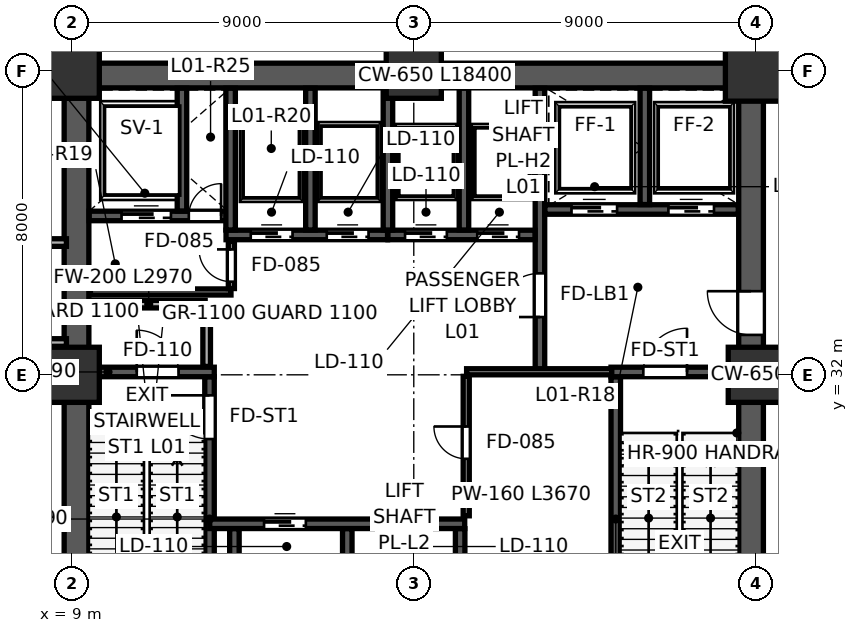
"""IFC4 building model, lengths in metres.
Left out: names, types, materials, properties, quantities, classifications, styles, units other than length and angle.
Written with IfcOpenShell. Run it as: python <this file> out.ifc"""

import sys

from ifc_helpers import new_model, si_unit, direction, frame, frame_2d, origin, origin_2d, place, context, subcontext, project, spatial, rectangle, extrude, source, transform, mapped, element, fill, save


model = new_model("IFC4")
c1 = context("Model", 3, precision=1e-05, world=origin(), true_north=direction((0.0, 1.0)))
c2 = subcontext(c1, "Body", "Model", "MODEL_VIEW")
j1 = project(units=[si_unit("LENGTHUNIT", "METRE"), si_unit("PLANEANGLEUNIT", "RADIAN")], contexts=[c1])
p1 = place(None, origin())
s1 = spatial("IfcSite", under=j1, at=p1, CompositionType="ELEMENT")
p2 = place(p1, origin())
s2 = spatial("IfcBuilding", under=s1, at=p2, CompositionType="ELEMENT")
p3 = place(p2, origin())
s3 = spatial("IfcBuildingStorey", under=s2, at=p3, CompositionType="ELEMENT", Elevation=0.0)
m1 = source(origin(), c2, "Body", "SweptSolid", [
    extrude(rectangle(XDim=1.45, YDim=1.45, at=origin_2d()), origin(), (0.0, 0.0, 1.0), 5.999),
])
for number, where, z_axis, x_axis in (
    (1, (9.0, 32.0, 0.001), (0.0, 0.0, 1.0), (1.0, 0.0, 0.0)),
    (2, (9.0, 40.0, 0.001), (0.0, 0.0, 1.0), (1.0, 0.0, 0.0)),
    (3, (18.0, 40.0, 0.001), (0.0, 0.0, 1.0), (1.0, 0.0, 0.0)),
    (4, (27.0, 32.0, 0.001), (0.0, 0.0, 1.0), (1.0, 0.0, 0.0)),
):
    element("IfcColumn", number, at=place(p3, frame(where, z_axis=z_axis, x_axis=x_axis)), inside=s3, PredefinedType="COLUMN", context=c2, shape_type="MappedRepresentation", body=[
        mapped(m1, transform((0.0, 0.0, 0.0), scale=1.0)),
    ])
m2 = source(origin(), c2, "Body", "SweptSolid", [
    extrude(rectangle(XDim=1.6, YDim=1.6, at=origin_2d()), origin(), (0.0, 0.0, 1.0), 5.999),
])
p4 = place(p3, frame((27.0, 40.0, 0.001), z_axis=(0.0, 0.0, 1.0), x_axis=(1.0, 0.0, 0.0)))
e5 = element("IfcColumn", 5, at=p4, inside=s3, PredefinedType="COLUMN", context=c2, shape_type="MappedRepresentation", body=[
    mapped(m2, transform((0.0, 0.0, 0.0), scale=1.0)),
])
p5 = place(p3, frame((9.125, 24.45, 0.0), z_axis=(0.0, 0.0, 1.0), x_axis=(0.0, 1.0, 0.0)))
e6 = element("IfcWall", 6, at=p5, inside=s3, PredefinedType="SHEAR", context=c2, shape_type="SweptSolid", body=[
    extrude(rectangle(XDim=15.1, YDim=0.65, at=frame_2d((7.55, 0.0))), origin(), (0.0, 0.0, 1.0), 5.74),
])
p6 = place(p3, frame((26.875, 24.45, 0.0), z_axis=(0.0, 0.0, 1.0), x_axis=(0.0, 1.0, 0.0)))
e7 = element("IfcWall", 7, at=p6, inside=s3, PredefinedType="SHEAR", context=c2, shape_type="SweptSolid", body=[
    extrude(rectangle(XDim=15.1, YDim=0.65, at=frame_2d((7.55, 0.0))), origin(), (0.0, 0.0, 1.0), 5.74),
])
p7 = place(p6, frame((8.6, 0.0, 0.0)))
e8 = element("IfcOpeningElement", 8, at=p7, cuts=e7, PredefinedType="OPENING", context=c2, shape_type="SweptSolid", body=[
    extrude(rectangle(XDim=1.15, YDim=2.2, at=frame_2d((0.575, 1.1))), frame((0.0, 0.335, 0.0), z_axis=(0.0, -1.0, 0.0), x_axis=(1.0, 0.0, 0.0)), (0.0, 0.0, 1.0), 0.67),
])
p8 = place(p3, frame((8.8, 39.875, 0.0), z_axis=(0.0, 0.0, 1.0), x_axis=(1.0, 0.0, 0.0)))
e9 = element("IfcWall", 9, at=p8, inside=s3, PredefinedType="SHEAR", context=c2, shape_type="SweptSolid", body=[
    extrude(rectangle(XDim=18.4, YDim=0.65, at=frame_2d((9.2, 0.0))), origin(), (0.0, 0.0, 1.0), 5.74),
])
p9 = place(p3, frame((12.625, 24.46, 0.0), z_axis=(0.0, 0.0, 1.0), x_axis=(0.0, 1.0, 0.0)))
e10 = element("IfcWall", 10, at=p9, inside=s3, PredefinedType="SHEAR", context=c2, shape_type="SweptSolid", body=[
    extrude(rectangle(XDim=7.49, YDim=0.25, at=frame_2d((3.745, 0.0))), origin(), (0.0, 0.0, 1.0), 5.74),
])
p10 = place(p9, frame((5.85, 0.0, 0.0)))
e11 = element("IfcOpeningElement", 11, at=p10, cuts=e10, PredefinedType="OPENING", context=c2, shape_type="SweptSolid", body=[
    extrude(rectangle(XDim=1.15, YDim=2.2, at=frame_2d((0.575, 1.1))), frame((0.0, 0.135, 0.0), z_axis=(0.0, -1.0, 0.0), x_axis=(1.0, 0.0, 0.0)), (0.0, 0.0, 1.0), 0.27),
])
p11 = place(p3, frame((9.46, 32.075, 0.0), z_axis=(0.0, 0.0, 1.0), x_axis=(1.0, 0.0, 0.0)))
e12 = element("IfcWall", 12, at=p11, inside=s3, PredefinedType="SHEAR", context=c2, shape_type="SweptSolid", body=[
    extrude(rectangle(XDim=3.29, YDim=0.25, at=frame_2d((1.645, 0.0))), origin(), (0.0, 0.0, 1.0), 5.74),
])
p12 = place(p11, frame((1.25, 0.0, 0.0)))
e13 = element("IfcOpeningElement", 13, at=p12, cuts=e12, PredefinedType="OPENING", context=c2, shape_type="SweptSolid", body=[
    extrude(rectangle(XDim=1.1, YDim=2.2, at=frame_2d((0.55, 1.1))), frame((0.0, 0.135, 0.0), z_axis=(0.0, -1.0, 0.0), x_axis=(1.0, 0.0, 0.0)), (0.0, 0.0, 1.0), 0.27),
])
p13 = place(p3, frame((23.315, 24.46, 0.0), z_axis=(0.0, 0.0, 1.0), x_axis=(0.0, 1.0, 0.0)))
e14 = element("IfcWall", 14, at=p13, inside=s3, PredefinedType="SHEAR", context=c2, shape_type="SweptSolid", body=[
    extrude(rectangle(XDim=7.49, YDim=0.25, at=frame_2d((3.745, 0.0))), origin(), (0.0, 0.0, 1.0), 5.74),
])
p14 = place(p3, frame((23.19, 32.075, 0.0), z_axis=(0.0, 0.0, 1.0), x_axis=(1.0, 0.0, 0.0)))
e15 = element("IfcWall", 15, at=p14, inside=s3, PredefinedType="SHEAR", context=c2, shape_type="SweptSolid", body=[
    extrude(rectangle(XDim=3.35, YDim=0.25, at=frame_2d((1.675, 0.0))), origin(), (0.0, 0.0, 1.0), 5.74),
])
p15 = place(p14, frame((0.85, 0.0, 0.0)))
e16 = element("IfcOpeningElement", 16, at=p15, cuts=e15, PredefinedType="OPENING", context=c2, shape_type="SweptSolid", body=[
    extrude(rectangle(XDim=1.15, YDim=2.2, at=frame_2d((0.575, 1.1))), frame((0.0, 0.135, 0.0), z_axis=(0.0, -1.0, 0.0), x_axis=(1.0, 0.0, 0.0)), (0.0, 0.0, 1.0), 0.27),
])
p16 = place(p3, frame((21.32, 32.12, 0.0), z_axis=(0.0, 0.0, 1.0), x_axis=(0.0, 1.0, 0.0)))
e17 = element("IfcWall", 17, at=p16, inside=s3, PredefinedType="SHEAR", context=c2, shape_type="SweptSolid", body=[
    extrude(rectangle(XDim=7.42, YDim=0.25, at=frame_2d((3.71, 0.0))), origin(), (0.0, 0.0, 1.0), 5.74),
])
p17 = place(p16, frame((1.4, 0.0, 0.0)))
e18 = element("IfcOpeningElement", 18, at=p17, cuts=e17, PredefinedType="OPENING", context=c2, shape_type="SweptSolid", body=[
    extrude(rectangle(XDim=1.15, YDim=2.2, at=frame_2d((0.575, 1.1))), frame((0.0, 0.135, 0.0), z_axis=(0.0, -1.0, 0.0), x_axis=(1.0, 0.0, 0.0)), (0.0, 0.0, 1.0), 0.27),
])
p18 = place(p3, frame((9.46, 36.18, 0.0), z_axis=(0.0, 0.0, 1.0), x_axis=(1.0, 0.0, 0.0)))
e19 = element("IfcWall", 19, at=p18, inside=s3, PredefinedType="SHEAR", context=c2, shape_type="SweptSolid", body=[
    extrude(rectangle(XDim=3.79, YDim=0.25, at=frame_2d((1.895, 0.0))), origin(), (0.0, 0.0, 1.0), 5.74),
])
p19 = place(p18, frame((2.62, 0.0, 0.0)))
e20 = element("IfcOpeningElement", 20, at=p19, cuts=e19, PredefinedType="OPENING", context=c2, shape_type="SweptSolid", body=[
    extrude(rectangle(XDim=0.85, YDim=2.1, at=frame_2d((0.425, 1.05))), frame((0.0, 0.135, 0.0), z_axis=(0.0, -1.0, 0.0), x_axis=(1.0, 0.0, 0.0)), (0.0, 0.0, 1.0), 0.27),
])
p20 = place(p18, frame((0.85, 0.0, 0.0)))
e21 = element("IfcOpeningElement", 21, at=p20, cuts=e19, PredefinedType="OPENING", context=c2, shape_type="SweptSolid", body=[
    extrude(rectangle(XDim=1.3, YDim=2.25, at=frame_2d((0.65, 1.125))), frame((0.0, 0.135, 0.0), z_axis=(0.0, -1.0, 0.0), x_axis=(1.0, 0.0, 0.0)), (0.0, 0.0, 1.0), 0.27),
])
p21 = place(p3, frame((11.9, 36.31, 0.0), z_axis=(0.0, 0.0, 1.0), x_axis=(0.0, 1.0, 0.0)))
e22 = element("IfcWall", 22, at=p21, inside=s3, PredefinedType="SHEAR", context=c2, shape_type="SweptSolid", body=[
    extrude(rectangle(XDim=3.23, YDim=0.25, at=frame_2d((1.615, 0.0))), origin(), (0.0, 0.0, 1.0), 5.74),
])
p22 = place(p3, frame((21.45, 36.35, 0.0), z_axis=(0.0, 0.0, 1.0), x_axis=(1.0, 0.0, 0.0)))
e23 = element("IfcWall", 23, at=p22, inside=s3, PredefinedType="SHEAR", context=c2, shape_type="SweptSolid", body=[
    extrude(rectangle(XDim=5.09, YDim=0.25, at=frame_2d((2.545, 0.0))), origin(), (0.0, 0.0, 1.0), 5.74),
])
p23 = place(p22, frame((0.7, 0.0, 0.0)))
e24 = element("IfcOpeningElement", 24, at=p23, cuts=e23, PredefinedType="OPENING", context=c2, shape_type="SweptSolid", body=[
    extrude(rectangle(XDim=1.2, YDim=2.2, at=frame_2d((0.6, 1.1))), frame((0.0, 0.135, 0.0), z_axis=(0.0, -1.0, 0.0), x_axis=(1.0, 0.0, 0.0)), (0.0, 0.0, 1.0), 0.27),
])
p24 = place(p22, frame((3.25, 0.0, 0.0)))
e25 = element("IfcOpeningElement", 25, at=p24, cuts=e23, PredefinedType="OPENING", context=c2, shape_type="SweptSolid", body=[
    extrude(rectangle(XDim=1.2, YDim=2.2, at=frame_2d((0.6, 1.1))), frame((0.0, 0.135, 0.0), z_axis=(0.0, -1.0, 0.0), x_axis=(1.0, 0.0, 0.0)), (0.0, 0.0, 1.0), 0.27),
])
p25 = place(p3, frame((24.08, 36.48, 0.0), z_axis=(0.0, 0.0, 1.0), x_axis=(0.0, 1.0, 0.0)))
e26 = element("IfcWall", 26, at=p25, inside=s3, PredefinedType="SHEAR", context=c2, shape_type="SweptSolid", body=[
    extrude(rectangle(XDim=3.06, YDim=0.25, at=frame_2d((1.53, 0.0))), origin(), (0.0, 0.0, 1.0), 5.74),
])
p26 = place(p3, frame((12.63, 28.08, 0.0), z_axis=(0.0, 0.0, 1.0), x_axis=(1.0, 0.0, 0.0)))
e27 = element("IfcWall", 27, at=p26, inside=s3, PredefinedType="SHEAR", context=c2, shape_type="SweptSolid", body=[
    extrude(rectangle(XDim=6.71, YDim=0.25, at=frame_2d((3.355, 0.0))), origin(), (0.0, 0.0, 1.0), 5.74),
])
p27 = place(p26, frame((1.43, 0.0, 0.0)))
e28 = element("IfcOpeningElement", 28, at=p27, cuts=e27, PredefinedType="OPENING", context=c2, shape_type="SweptSolid", body=[
    extrude(rectangle(XDim=1.1, YDim=2.2, at=frame_2d((0.55, 1.1))), frame((0.0, 0.135, 0.0), z_axis=(0.0, -1.0, 0.0), x_axis=(1.0, 0.0, 0.0)), (0.0, 0.0, 1.0), 0.27),
])
p28 = place(p26, frame((4.43, 0.0, 0.0)))
e29 = element("IfcOpeningElement", 29, at=p28, cuts=e27, PredefinedType="OPENING", context=c2, shape_type="SweptSolid", body=[
    extrude(rectangle(XDim=1.1, YDim=2.2, at=frame_2d((0.55, 1.1))), frame((0.0, 0.135, 0.0), z_axis=(0.0, -1.0, 0.0), x_axis=(1.0, 0.0, 0.0)), (0.0, 0.0, 1.0), 0.27),
])
for number, where, z_axis, x_axis in (
    (30, (13.28, 24.46, 0.0), (0.0, 0.0, 1.0), (0.0, 1.0, 0.0)),
    (31, (16.25, 24.46, 0.0), (0.0, 0.0, 1.0), (0.0, 1.0, 0.0)),
    (32, (19.22, 24.46, 0.0), (0.0, 0.0, 1.0), (0.0, 1.0, 0.0)),
):
    element("IfcWall", number, at=place(p3, frame(where, z_axis=z_axis, x_axis=x_axis)), inside=s3, PredefinedType="SHEAR", context=c2, shape_type="SweptSolid", body=[
        extrude(rectangle(XDim=3.49, YDim=0.25, at=frame_2d((1.745, 0.0))), origin(), (0.0, 0.0, 1.0), 5.74),
    ])
p29 = place(p3, frame((13.06, 35.68, 0.0), z_axis=(0.0, 0.0, 1.0), x_axis=(1.0, 0.0, 0.0)))
e33 = element("IfcWall", 33, at=p29, inside=s3, PredefinedType="SHEAR", context=c2, shape_type="SweptSolid", body=[
    extrude(rectangle(XDim=4.25, YDim=0.25, at=frame_2d((2.125, 0.0))), origin(), (0.0, 0.0, 1.0), 5.74),
])
p30 = place(p29, frame((0.65, 0.0, 0.0)))
e34 = element("IfcOpeningElement", 34, at=p30, cuts=e33, PredefinedType="OPENING", context=c2, shape_type="SweptSolid", body=[
    extrude(rectangle(XDim=1.1, YDim=2.2, at=frame_2d((0.55, 1.1))), frame((0.0, 0.135, 0.0), z_axis=(0.0, -1.0, 0.0), x_axis=(1.0, 0.0, 0.0)), (0.0, 0.0, 1.0), 0.27),
])
p31 = place(p29, frame((2.65, 0.0, 0.0)))
e35 = element("IfcOpeningElement", 35, at=p31, cuts=e33, PredefinedType="OPENING", context=c2, shape_type="SweptSolid", body=[
    extrude(rectangle(XDim=1.1, YDim=2.2, at=frame_2d((0.55, 1.1))), frame((0.0, 0.135, 0.0), z_axis=(0.0, -1.0, 0.0), x_axis=(1.0, 0.0, 0.0)), (0.0, 0.0, 1.0), 0.27),
])
for number, where, z_axis, x_axis in (
    (36, (13.18, 35.81, 0.0), (0.0, 0.0, 1.0), (0.0, 1.0, 0.0)),
    (37, (15.28, 35.81, 0.0), (0.0, 0.0, 1.0), (0.0, 1.0, 0.0)),
):
    element("IfcWall", number, at=place(p3, frame(where, z_axis=z_axis, x_axis=x_axis)), inside=s3, PredefinedType="SHEAR", context=c2, shape_type="SweptSolid", body=[
        extrude(rectangle(XDim=3.73, YDim=0.25, at=frame_2d((1.865, 0.0))), origin(), (0.0, 0.0, 1.0), 5.74),
    ])
p32 = place(p3, frame((17.32, 35.68, 0.0), z_axis=(0.0, 0.0, 1.0), x_axis=(1.0, 0.0, 0.0)))
e38 = element("IfcWall", 38, at=p32, inside=s3, PredefinedType="SHEAR", context=c2, shape_type="SweptSolid", body=[
    extrude(rectangle(XDim=3.87, YDim=0.25, at=frame_2d((1.935, 0.0))), origin(), (0.0, 0.0, 1.0), 5.74),
])
p33 = place(p32, frame((0.45, 0.0, 0.0)))
e39 = element("IfcOpeningElement", 39, at=p33, cuts=e38, PredefinedType="OPENING", context=c2, shape_type="SweptSolid", body=[
    extrude(rectangle(XDim=1.1, YDim=2.2, at=frame_2d((0.55, 1.1))), frame((0.0, 0.135, 0.0), z_axis=(0.0, -1.0, 0.0), x_axis=(1.0, 0.0, 0.0)), (0.0, 0.0, 1.0), 0.27),
])
p34 = place(p32, frame((2.35, 0.0, 0.0)))
e40 = element("IfcOpeningElement", 40, at=p34, cuts=e38, PredefinedType="OPENING", context=c2, shape_type="SweptSolid", body=[
    extrude(rectangle(XDim=1.1, YDim=2.2, at=frame_2d((0.55, 1.1))), frame((0.0, 0.135, 0.0), z_axis=(0.0, -1.0, 0.0), x_axis=(1.0, 0.0, 0.0)), (0.0, 0.0, 1.0), 0.27),
])
for number, where, z_axis, x_axis in (
    (41, (17.32, 35.81, 0.0), (0.0, 0.0, 1.0), (0.0, 1.0, 0.0)),
    (42, (19.32, 35.81, 0.0), (0.0, 0.0, 1.0), (0.0, 1.0, 0.0)),
):
    element("IfcWall", number, at=place(p3, frame(where, z_axis=z_axis, x_axis=x_axis)), inside=s3, PredefinedType="SHEAR", context=c2, shape_type="SweptSolid", body=[
        extrude(rectangle(XDim=3.73, YDim=0.25, at=frame_2d((1.865, 0.0))), origin(), (0.0, 0.0, 1.0), 5.74),
    ])
p35 = place(p3, frame((9.49, 34.18, 0.0), z_axis=(0.0, 0.0, 1.0), x_axis=(1.0, 0.0, 0.0)))
e43 = element("IfcWall", 43, at=p35, inside=s3, PredefinedType="PARTITIONING", context=c2, shape_type="SweptSolid", body=[
    extrude(rectangle(XDim=3.7, YDim=0.16, at=frame_2d((1.85, 0.0))), origin(), (0.0, 0.0, 1.0), 5.74),
])
p36 = place(p3, frame((13.2, 34.27, 0.0), z_axis=(0.0, 0.0, 1.0), x_axis=(0.0, 1.0, 0.0)))
e44 = element("IfcWall", 44, at=p36, inside=s3, PredefinedType="PARTITIONING", context=c2, shape_type="SweptSolid", body=[
    extrude(rectangle(XDim=1.24, YDim=0.16, at=frame_2d((0.62, 0.0))), origin(), (0.0, 0.0, 1.0), 5.74),
])
p37 = place(p36, frame((0.18, 0.0, 0.0)))
e45 = element("IfcOpeningElement", 45, at=p37, cuts=e44, PredefinedType="OPENING", context=c2, shape_type="SweptSolid", body=[
    extrude(rectangle(XDim=0.85, YDim=2.1, at=frame_2d((0.425, 1.05))), frame((0.0, 0.09, 0.0), z_axis=(0.0, -1.0, 0.0), x_axis=(1.0, 0.0, 0.0)), (0.0, 0.0, 1.0), 0.18),
])
p38 = place(p3, frame((19.39, 32.08, 0.0), z_axis=(0.0, 0.0, 1.0), x_axis=(1.0, 0.0, 0.0)))
e46 = element("IfcWall", 46, at=p38, inside=s3, PredefinedType="PARTITIONING", context=c2, shape_type="SweptSolid", body=[
    extrude(rectangle(XDim=3.82, YDim=0.16, at=frame_2d((1.91, 0.0))), origin(), (0.0, 0.0, 1.0), 5.74),
])
p39 = place(p3, frame((19.38, 28.29, 0.0), z_axis=(0.0, 0.0, 1.0), x_axis=(0.0, 1.0, 0.0)))
e47 = element("IfcWall", 47, at=p39, inside=s3, PredefinedType="PARTITIONING", context=c2, shape_type="SweptSolid", body=[
    extrude(rectangle(XDim=3.67, YDim=0.16, at=frame_2d((1.835, 0.0))), origin(), (0.0, 0.0, 1.0), 5.74),
])
p40 = place(p39, frame((1.5, 0.0, 0.0)))
e48 = element("IfcOpeningElement", 48, at=p40, cuts=e47, PredefinedType="OPENING", context=c2, shape_type="SweptSolid", body=[
    extrude(rectangle(XDim=0.85, YDim=2.1, at=frame_2d((0.425, 1.05))), frame((0.0, 0.09, 0.0), z_axis=(0.0, -1.0, 0.0), x_axis=(1.0, 0.0, 0.0)), (0.0, 0.0, 1.0), 0.18),
])
p41 = place(p3, frame((-0.51, 32.85, 0.0), z_axis=(0.0, 0.0, 1.0), x_axis=(1.0, 0.0, 0.0)))
e49 = element("IfcWall", 49, at=p41, inside=s3, PredefinedType="SOLIDWALL", context=c2, shape_type="SweptSolid", body=[
    extrude(rectangle(XDim=9.37, YDim=0.2, at=frame_2d((4.685, 0.0))), origin(), (0.0, 0.0, 1.0), 4.875),
])
p42 = place(p3, frame((-0.51, 35.48, 0.0), z_axis=(0.0, 0.0, 1.0), x_axis=(1.0, 0.0, 0.0)))
e50 = element("IfcWall", 50, at=p42, inside=s3, PredefinedType="SOLIDWALL", context=c2, shape_type="SweptSolid", body=[
    extrude(rectangle(XDim=9.37, YDim=0.2, at=frame_2d((4.685, 0.0))), origin(), (0.0, 0.0, 1.0), 4.875),
])
p43 = place(p42, frame((7.35, 0.0, 0.0)))
e51 = element("IfcOpeningElement", 51, at=p43, cuts=e50, PredefinedType="OPENING", context=c2, shape_type="SweptSolid", body=[
    extrude(rectangle(XDim=1.0, YDim=2.15, at=frame_2d((0.5, 1.075))), frame((0.0, 0.11, 0.0), z_axis=(0.0, -1.0, 0.0), x_axis=(1.0, 0.0, 0.0)), (0.0, 0.0, 1.0), 0.22),
])
p44 = place(p3, frame((9.54, 33.86, 0.0), z_axis=(0.0, 0.0, 1.0), x_axis=(1.0, 0.0, 0.0)))
e52 = element("IfcWall", 52, at=p44, inside=s3, PredefinedType="SOLIDWALL", context=c2, shape_type="SweptSolid", body=[
    extrude(rectangle(XDim=2.97, YDim=0.2, at=frame_2d((1.485, 0.0))), origin(), (0.0, 0.0, 1.0), 5.74),
])
p45 = place(p3, frame((12.55, 32.22, 0.0), z_axis=(0.0, 0.0, 1.0), x_axis=(0.0, 1.0, 0.0)))
e53 = element("IfcWall", 53, at=p45, inside=s3, PredefinedType="SOLIDWALL", context=c2, shape_type="SweptSolid", body=[
    extrude(rectangle(XDim=1.6, YDim=0.2, at=frame_2d((0.8, 0.0))), origin(), (0.0, 0.0, 1.0), 5.74),
])
m3 = source(origin(), c2, "Body", "SweptSolid", [
    extrude(rectangle(XDim=1.15, YDim=2.2, at=frame_2d((0.575, 1.1))), frame((0.0, 0.025, 0.0), z_axis=(0.0, -1.0, 0.0), x_axis=(1.0, 0.0, 0.0)), (0.0, 0.0, 1.0), 0.05),
])
p46 = place(p10, origin())
e54 = element("IfcDoor", 54, at=p46, inside=s3, OperationType="SINGLE_SWING_RIGHT", PredefinedType="DOOR", context=c2, shape_type="MappedRepresentation", body=[
    mapped(m3, transform((0.0, 0.0, 0.0), scale=1.0)),
])
fill(e11, e54)
m4 = source(origin(), c2, "Body", "SweptSolid", [
    extrude(rectangle(XDim=1.15, YDim=2.2, at=frame_2d((0.575, 1.1))), frame((0.0, 0.025, 0.0), z_axis=(0.0, -1.0, 0.0), x_axis=(1.0, 0.0, 0.0)), (0.0, 0.0, 1.0), 0.05),
])
p47 = place(p17, origin())
e55 = element("IfcDoor", 55, at=p47, inside=s3, OperationType="SINGLE_SWING_LEFT", PredefinedType="DOOR", context=c2, shape_type="MappedRepresentation", body=[
    mapped(m4, transform((0.0, 0.0, 0.0), scale=1.0)),
])
fill(e18, e55)
p48 = place(p15, origin())
e56 = element("IfcDoor", 56, at=p48, inside=s3, OperationType="SINGLE_SWING_RIGHT", PredefinedType="DOOR", context=c2, shape_type="MappedRepresentation", body=[
    mapped(m3, transform((0.0, 0.0, 0.0), scale=1.0)),
])
fill(e16, e56)
p49 = place(p7, origin())
e57 = element("IfcDoor", 57, at=p49, inside=s3, OperationType="SINGLE_SWING_RIGHT", PredefinedType="DOOR", context=c2, shape_type="MappedRepresentation", body=[
    mapped(m4, transform((0.0, 0.0, 0.0), scale=1.0)),
])
fill(e8, e57)
m5 = source(origin(), c2, "Body", "SweptSolid", [
    extrude(rectangle(XDim=0.85, YDim=2.1, at=frame_2d((0.425, 1.05))), frame((0.0, 0.025, 0.0), z_axis=(0.0, -1.0, 0.0), x_axis=(1.0, 0.0, 0.0)), (0.0, 0.0, 1.0), 0.05),
])
p50 = place(p19, origin())
e58 = element("IfcDoor", 58, at=p50, inside=s3, OperationType="SINGLE_SWING_RIGHT", PredefinedType="DOOR", context=c2, shape_type="MappedRepresentation", body=[
    mapped(m5, transform((0.0, 0.0, 0.0), scale=1.0)),
])
fill(e20, e58)
m6 = source(origin(), c2, "Body", "SweptSolid", [
    extrude(rectangle(XDim=1.1, YDim=2.2, at=frame_2d((0.55, 1.1))), frame((0.0, 0.025, 0.0), z_axis=(0.0, -1.0, 0.0), x_axis=(1.0, 0.0, 0.0)), (0.0, 0.0, 1.0), 0.05),
])
p51 = place(p12, origin())
e59 = element("IfcDoor", 59, at=p51, inside=s3, OperationType="SINGLE_SWING_LEFT", PredefinedType="DOOR", context=c2, shape_type="MappedRepresentation", body=[
    mapped(m6, transform((0.0, 0.0, 0.0), scale=1.0)),
])
fill(e13, e59)
m7 = source(origin(), c2, "Body", "SweptSolid", [
    extrude(rectangle(XDim=1.1, YDim=2.2, at=frame_2d((0.55, 1.1))), frame((0.0, 0.025, 0.0), z_axis=(0.0, -1.0, 0.0), x_axis=(1.0, 0.0, 0.0)), (0.0, 0.0, 1.0), 0.05),
])
p52 = place(p27, origin())
e60 = element("IfcDoor", 60, at=p52, inside=s3, OperationType="SLIDING_TO_LEFT", PredefinedType="DOOR", context=c2, shape_type="MappedRepresentation", body=[
    mapped(m7, transform((0.0, 0.0, 0.0), scale=1.0)),
])
fill(e28, e60)
p53 = place(p28, origin())
e61 = element("IfcDoor", 61, at=p53, inside=s3, OperationType="SLIDING_TO_RIGHT", PredefinedType="DOOR", context=c2, shape_type="MappedRepresentation", body=[
    mapped(m7, transform((0.0, 0.0, 0.0), scale=1.0)),
])
fill(e29, e61)
p54 = place(p30, origin())
e62 = element("IfcDoor", 62, at=p54, inside=s3, OperationType="SLIDING_TO_LEFT", PredefinedType="DOOR", context=c2, shape_type="MappedRepresentation", body=[
    mapped(m7, transform((0.0, 0.0, 0.0), scale=1.0)),
])
fill(e34, e62)
p55 = place(p31, origin())
e63 = element("IfcDoor", 63, at=p55, inside=s3, OperationType="SLIDING_TO_RIGHT", PredefinedType="DOOR", context=c2, shape_type="MappedRepresentation", body=[
    mapped(m7, transform((0.0, 0.0, 0.0), scale=1.0)),
])
fill(e35, e63)
p56 = place(p33, origin())
e64 = element("IfcDoor", 64, at=p56, inside=s3, OperationType="SLIDING_TO_LEFT", PredefinedType="DOOR", context=c2, shape_type="MappedRepresentation", body=[
    mapped(m7, transform((0.0, 0.0, 0.0), scale=1.0)),
])
fill(e39, e64)
p57 = place(p34, origin())
e65 = element("IfcDoor", 65, at=p57, inside=s3, OperationType="SLIDING_TO_RIGHT", PredefinedType="DOOR", context=c2, shape_type="MappedRepresentation", body=[
    mapped(m7, transform((0.0, 0.0, 0.0), scale=1.0)),
])
fill(e40, e65)
m8 = source(origin(), c2, "Body", "SweptSolid", [
    extrude(rectangle(XDim=1.2, YDim=2.2, at=frame_2d((0.6, 1.1))), frame((0.0, 0.025, 0.0), z_axis=(0.0, -1.0, 0.0), x_axis=(1.0, 0.0, 0.0)), (0.0, 0.0, 1.0), 0.05),
])
p58 = place(p23, origin())
e66 = element("IfcDoor", 66, at=p58, inside=s3, OperationType="SLIDING_TO_LEFT", PredefinedType="DOOR", context=c2, shape_type="MappedRepresentation", body=[
    mapped(m8, transform((0.0, 0.0, 0.0), scale=1.0)),
])
fill(e24, e66)
p59 = place(p24, origin())
e67 = element("IfcDoor", 67, at=p59, inside=s3, OperationType="SLIDING_TO_RIGHT", PredefinedType="DOOR", context=c2, shape_type="MappedRepresentation", body=[
    mapped(m8, transform((0.0, 0.0, 0.0), scale=1.0)),
])
fill(e25, e67)
m9 = source(origin(), c2, "Body", "SweptSolid", [
    extrude(rectangle(XDim=1.3, YDim=2.25, at=frame_2d((0.65, 1.125))), frame((0.0, 0.025, 0.0), z_axis=(0.0, -1.0, 0.0), x_axis=(1.0, 0.0, 0.0)), (0.0, 0.0, 1.0), 0.05),
])
p60 = place(p20, origin())
e68 = element("IfcDoor", 68, at=p60, inside=s3, OperationType="SLIDING_TO_LEFT", PredefinedType="DOOR", context=c2, shape_type="MappedRepresentation", body=[
    mapped(m9, transform((0.0, 0.0, 0.0), scale=1.0)),
])
fill(e21, e68)
p61 = place(p37, origin())
e69 = element("IfcDoor", 69, at=p61, inside=s3, OperationType="SINGLE_SWING_RIGHT", PredefinedType="DOOR", context=c2, shape_type="MappedRepresentation", body=[
    mapped(m5, transform((0.0, 0.0, 0.0), scale=1.0)),
])
fill(e45, e69)
p62 = place(p40, origin())
e70 = element("IfcDoor", 70, at=p62, inside=s3, OperationType="SINGLE_SWING_RIGHT", PredefinedType="DOOR", context=c2, shape_type="MappedRepresentation", body=[
    mapped(m5, transform((0.0, 0.0, 0.0), scale=1.0)),
])
fill(e48, e70)
save(model, sys.argv[1])
